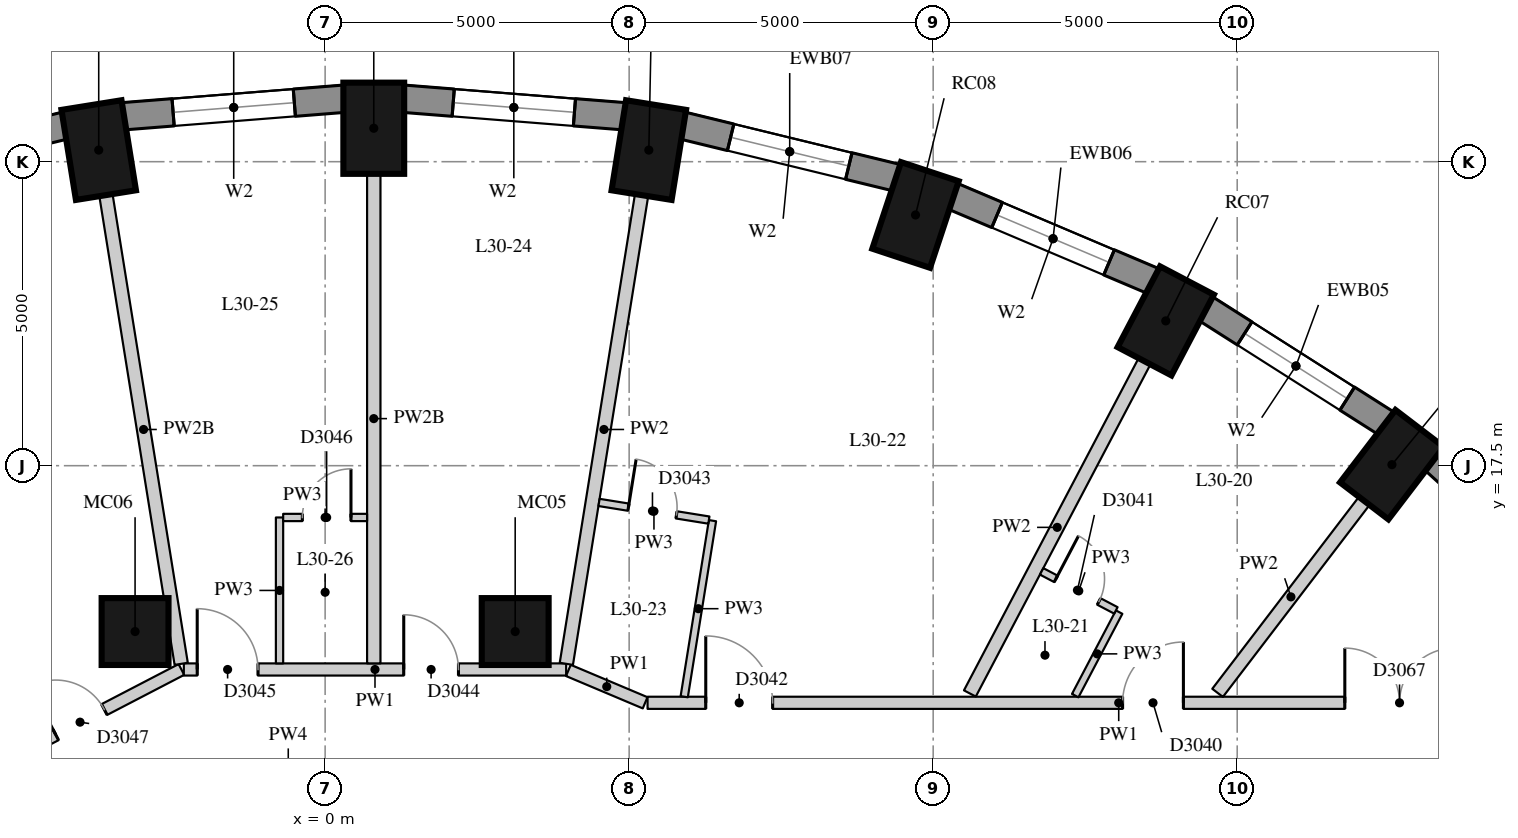
"""IFC4 building model, lengths in metres.
Left out: names, types, materials, properties, quantities, classifications, styles, units other than length and angle.
Written with IfcOpenShell. Run it as: python <this file> out.ifc"""

import sys

from ifc_helpers import new_model, si_unit, direction, frame, frame_2d, origin, origin_2d, place, context, subcontext, project, spatial, rectangle, extrude, element, fill, save


model = new_model("IFC4")
c1 = context("Model", 3, precision=1e-05, world=origin(), true_north=direction((0.0, 1.0)))
c2 = subcontext(c1, "Body", "Model", "MODEL_VIEW")
j1 = project(units=[si_unit("LENGTHUNIT", "METRE"), si_unit("PLANEANGLEUNIT", "RADIAN")], contexts=[c1])
p1 = place(None, origin())
s1 = spatial("IfcSite", under=j1, at=p1, CompositionType="ELEMENT")
p2 = place(p1, origin())
s2 = spatial("IfcBuilding", under=s1, at=p2, CompositionType="ELEMENT")
p3 = place(p2, frame((0.0, 0.0, 108.7)))
s3 = spatial("IfcBuildingStorey", under=s2, at=p3, CompositionType="ELEMENT", Elevation=108.7)
for number, where, z_axis, x_axis in (
    (1, (17.545, 17.517, 0.0), (0.0, 0.0, 1.0), (0.607, 0.795, 0.0)),
    (2, (13.825, 19.882, 0.0), (0.0, 0.0, 1.0), (0.465, 0.885, 0.0)),
    (3, (9.71, 21.624, 0.0), (0.0, 0.0, 1.0), (0.315, 0.949, 0.0)),
    (4, (5.323, 22.691, 0.0), (0.0, 0.0, 1.0), (0.159, 0.987, 0.0)),
    (5, (0.8, 23.05, 0.0), (0.0, 0.0, 1.0), (0.0, 1.0, 0.0)),
    (6, (-3.724, 22.691, 0.0), (0.0, 0.0, 1.0), (-0.159, 0.987, 0.0)),
):
    element("IfcColumn", number, at=place(p3, frame(where, z_axis=z_axis, x_axis=x_axis)), inside=s3, PredefinedType="COLUMN", context=c2, shape_type="SweptSolid", body=[
        extrude(rectangle(XDim=1.5, YDim=1.0, at=origin_2d()), origin(), (0.0, 0.0, 1.0), 3.3),
    ])
for number, where, z_axis, x_axis in (
    (7, (3.126, 14.772, 0.0), (0.0, 0.0, 1.0), (1.0, 0.0, 0.0)),
    (8, (-3.126, 14.772, 0.0), (0.0, 0.0, 1.0), (1.0, 0.0, 0.0)),
):
    element("IfcColumn", number, at=place(p3, frame(where, z_axis=z_axis, x_axis=x_axis)), inside=s3, PredefinedType="COLUMN", context=c2, shape_type="SweptSolid", body=[
        extrude(rectangle(XDim=1.1, YDim=1.1, at=origin_2d()), origin(), (0.0, 0.0, 1.0), 3.3),
    ])
p4 = place(p3, frame((20.784, 15.281, 0.0), z_axis=(0.0, 0.0, 1.0), x_axis=(-0.74032902847, 0.672244694739, 0.0)))
e9 = element("IfcWall", 9, at=p4, inside=s3, PredefinedType="SOLIDWALL", context=c2, shape_type="SweptSolid", body=[
    extrude(rectangle(XDim=3.464, YDim=0.45, at=frame_2d((1.732, 0.0))), origin(), (0.0, 0.0, 1.0), 3.02),
])
p5 = place(p3, frame((17.456, 18.192, 0.0), z_axis=(0.0, 0.0, 1.0), x_axis=(-0.843880549131, 0.536531097699, 0.0)))
e10 = element("IfcWall", 10, at=p5, inside=s3, PredefinedType="SOLIDWALL", context=c2, shape_type="SweptSolid", body=[
    extrude(rectangle(XDim=3.532, YDim=0.45, at=frame_2d((1.766, 0.0))), origin(), (0.0, 0.0, 1.0), 3.02),
])
p6 = place(p5, frame((0.766, 0.0, 0.4)))
e11 = element("IfcOpeningElement", 11, at=p6, cuts=e10, PredefinedType="OPENING", context=c2, shape_type="SweptSolid", body=[
    extrude(rectangle(XDim=2.0, YDim=1.75, at=frame_2d((1.0, 0.875))), frame((0.0, 0.235, 0.0), z_axis=(0.0, -1.0, 0.0), x_axis=(1.0, 0.0, 0.0)), (0.0, 0.0, 1.0), 0.47),
])
p7 = place(p3, frame((13.625, 20.533, 0.0), z_axis=(0.0, 0.0, 1.0), x_axis=(-0.920869643542, 0.389870619055, 0.0)))
e12 = element("IfcWall", 12, at=p7, inside=s3, PredefinedType="SOLIDWALL", context=c2, shape_type="SweptSolid", body=[
    extrude(rectangle(XDim=3.591, YDim=0.45, at=frame_2d((1.796, 0.0))), origin(), (0.0, 0.0, 1.0), 3.02),
])
p8 = place(p7, frame((0.796, 0.0, 0.4)))
e13 = element("IfcOpeningElement", 13, at=p8, cuts=e12, PredefinedType="OPENING", context=c2, shape_type="SweptSolid", body=[
    extrude(rectangle(XDim=2.0, YDim=1.75, at=frame_2d((1.0, 0.875))), frame((0.0, 0.235, 0.0), z_axis=(0.0, -1.0, 0.0), x_axis=(1.0, 0.0, 0.0)), (0.0, 0.0, 1.0), 0.47),
])
p9 = place(p3, frame((9.406, 22.235, 0.0), z_axis=(0.0, 0.0, 1.0), x_axis=(-0.971667603162, 0.236351579148, 0.0)))
e14 = element("IfcWall", 14, at=p9, inside=s3, PredefinedType="SOLIDWALL", context=c2, shape_type="SweptSolid", body=[
    extrude(rectangle(XDim=3.635, YDim=0.45, at=frame_2d((1.817, 0.0))), origin(), (0.0, 0.0, 1.0), 3.02),
])
p10 = place(p9, frame((0.817, 0.0, 0.4)))
e15 = element("IfcOpeningElement", 15, at=p10, cuts=e14, PredefinedType="OPENING", context=c2, shape_type="SweptSolid", body=[
    extrude(rectangle(XDim=2.0, YDim=1.75, at=frame_2d((1.0, 0.875))), frame((0.0, 0.235, 0.0), z_axis=(0.0, -1.0, 0.0), x_axis=(1.0, 0.0, 0.0)), (0.0, 0.0, 1.0), 0.47),
])
p11 = place(p3, frame((4.927, 23.247, 0.0), z_axis=(0.0, 0.0, 1.0), x_axis=(-0.996862216754, 0.079156306178, 0.0)))
e16 = element("IfcWall", 16, at=p11, inside=s3, PredefinedType="SOLIDWALL", context=c2, shape_type="SweptSolid", body=[
    extrude(rectangle(XDim=3.658, YDim=0.45, at=frame_2d((1.829, 0.0))), origin(), (0.0, 0.0, 1.0), 3.02),
])
p12 = place(p11, frame((0.829, 0.0, 0.4)))
e17 = element("IfcOpeningElement", 17, at=p12, cuts=e16, PredefinedType="OPENING", context=c2, shape_type="SweptSolid", body=[
    extrude(rectangle(XDim=2.0, YDim=1.75, at=frame_2d((1.0, 0.875))), frame((0.0, 0.235, 0.0), z_axis=(0.0, -1.0, 0.0), x_axis=(1.0, 0.0, 0.0)), (0.0, 0.0, 1.0), 0.47),
])
p13 = place(p3, frame((0.32, 23.536, 0.0), z_axis=(0.0, 0.0, 1.0), x_axis=(-0.996862216754, -0.079156306178, 0.0)))
e18 = element("IfcWall", 18, at=p13, inside=s3, PredefinedType="SOLIDWALL", context=c2, shape_type="SweptSolid", body=[
    extrude(rectangle(XDim=3.658, YDim=0.45, at=frame_2d((1.829, 0.0))), origin(), (0.0, 0.0, 1.0), 3.02),
])
p14 = place(p13, frame((0.829, 0.0, 0.4)))
e19 = element("IfcOpeningElement", 19, at=p14, cuts=e18, PredefinedType="OPENING", context=c2, shape_type="SweptSolid", body=[
    extrude(rectangle(XDim=2.0, YDim=1.75, at=frame_2d((1.0, 0.875))), frame((0.0, 0.235, 0.0), z_axis=(0.0, -1.0, 0.0), x_axis=(1.0, 0.0, 0.0)), (0.0, 0.0, 1.0), 0.47),
])
p15 = place(p3, frame((-4.275, 23.094, 0.0), z_axis=(0.0, 0.0, 1.0), x_axis=(-0.971667603162, -0.236351579148, 0.0)))
e20 = element("IfcWall", 20, at=p15, inside=s3, PredefinedType="SOLIDWALL", context=c2, shape_type="SweptSolid", body=[
    extrude(rectangle(XDim=3.635, YDim=0.45, at=frame_2d((1.817, 0.0))), origin(), (0.0, 0.0, 1.0), 3.02),
])
p16 = place(p15, frame((0.817, 0.0, 0.4)))
e21 = element("IfcOpeningElement", 21, at=p16, cuts=e20, PredefinedType="OPENING", context=c2, shape_type="SweptSolid", body=[
    extrude(rectangle(XDim=2.0, YDim=1.75, at=frame_2d((1.0, 0.875))), frame((0.0, 0.235, 0.0), z_axis=(0.0, -1.0, 0.0), x_axis=(1.0, 0.0, 0.0)), (0.0, 0.0, 1.0), 0.47),
])
p17 = place(p3, frame((-7.757, 11.344, 0.0), z_axis=(0.0, 0.0, 1.0), x_axis=(0.887263483993, 0.461262951008, 0.0)))
e22 = element("IfcWall", 22, at=p17, inside=s3, PredefinedType="PARTITIONING", context=c2, shape_type="SweptSolid", body=[
    extrude(rectangle(XDim=6.079, YDim=0.2, at=frame_2d((3.04, 0.0))), origin(), (0.0, 0.0, 1.0), 3.02),
])
p18 = place(p17, frame((3.75, 0.0, 0.0)))
e23 = element("IfcOpeningElement", 23, at=p18, cuts=e22, PredefinedType="OPENING", context=c2, shape_type="SweptSolid", body=[
    extrude(rectangle(XDim=0.9, YDim=2.1, at=frame_2d((0.45, 1.05))), frame((0.0, 0.11, 0.0), z_axis=(0.0, -1.0, 0.0), x_axis=(1.0, 0.0, 0.0)), (0.0, 0.0, 1.0), 0.22),
])
p19 = place(p3, frame((-2.324, 14.148, 0.0), z_axis=(0.0, 0.0, 1.0), x_axis=(1.0, 0.0, 0.0)))
e24 = element("IfcWall", 24, at=p19, inside=s3, PredefinedType="PARTITIONING", context=c2, shape_type="SweptSolid", body=[
    extrude(rectangle(XDim=6.288, YDim=0.2, at=frame_2d((3.144, 0.0))), origin(), (0.0, 0.0, 1.0), 3.02),
])
p20 = place(p19, frame((3.617, 0.0, 0.0)))
e25 = element("IfcOpeningElement", 25, at=p20, cuts=e24, PredefinedType="OPENING", context=c2, shape_type="SweptSolid", body=[
    extrude(rectangle(XDim=0.9, YDim=2.1, at=frame_2d((0.45, 1.05))), frame((0.0, 0.11, 0.0), z_axis=(0.0, -1.0, 0.0), x_axis=(1.0, 0.0, 0.0)), (0.0, 0.0, 1.0), 0.22),
])
p21 = place(p19, frame((0.22, 0.0, 0.0)))
e26 = element("IfcOpeningElement", 26, at=p21, cuts=e24, PredefinedType="OPENING", context=c2, shape_type="SweptSolid", body=[
    extrude(rectangle(XDim=1.0, YDim=2.1, at=frame_2d((0.5, 1.05))), frame((0.0, 0.11, 0.0), z_axis=(0.0, -1.0, 0.0), x_axis=(1.0, 0.0, 0.0)), (0.0, 0.0, 1.0), 0.22),
])
p22 = place(p3, frame((4.0, 14.133, 0.0), z_axis=(0.0, 0.0, 1.0), x_axis=(0.921370144432, -0.388686322051, 0.0)))
e27 = element("IfcWall", 27, at=p22, inside=s3, PredefinedType="PARTITIONING", context=c2, shape_type="SweptSolid", body=[
    extrude(rectangle(XDim=1.37, YDim=0.2, at=frame_2d((0.685, 0.0))), origin(), (0.0, 0.0, 1.0), 3.02),
])
p23 = place(p3, frame((5.303, 13.6, 0.0), z_axis=(0.0, 0.0, 1.0), x_axis=(1.0, 0.0, 0.0)))
e28 = element("IfcWall", 28, at=p23, inside=s3, PredefinedType="PARTITIONING", context=c2, shape_type="SweptSolid", body=[
    extrude(rectangle(XDim=15.497, YDim=0.2, at=frame_2d((7.749, 0.0))), origin(), (0.0, 0.0, 1.0), 3.02),
])
p24 = place(p23, frame((7.812, 0.0, 0.0)))
e29 = element("IfcOpeningElement", 29, at=p24, cuts=e28, PredefinedType="OPENING", context=c2, shape_type="SweptSolid", body=[
    extrude(rectangle(XDim=1.0, YDim=2.1, at=frame_2d((0.5, 1.05))), frame((0.0, 0.11, 0.0), z_axis=(0.0, -1.0, 0.0), x_axis=(1.0, 0.0, 0.0)), (0.0, 0.0, 1.0), 0.22),
])
p25 = place(p23, frame((0.957, 0.0, 0.0)))
e30 = element("IfcOpeningElement", 30, at=p25, cuts=e28, PredefinedType="OPENING", context=c2, shape_type="SweptSolid", body=[
    extrude(rectangle(XDim=1.1, YDim=2.1, at=frame_2d((0.55, 1.05))), frame((0.0, 0.11, 0.0), z_axis=(0.0, -1.0, 0.0), x_axis=(1.0, 0.0, 0.0)), (0.0, 0.0, 1.0), 0.22),
])
p26 = place(p23, frame((11.467, 0.0, 0.0)))
e31 = element("IfcOpeningElement", 31, at=p26, cuts=e28, PredefinedType="OPENING", context=c2, shape_type="SweptSolid", body=[
    extrude(rectangle(XDim=1.8, YDim=2.1, at=frame_2d((0.9, 1.05))), frame((0.0, 0.11, 0.0), z_axis=(0.0, -1.0, 0.0), x_axis=(1.0, 0.0, 0.0)), (0.0, 0.0, 1.0), 0.22),
])
p27 = place(p3, frame((17.089, 16.921, 0.0), z_axis=(0.0, 0.0, 1.0), x_axis=(-0.607055443677, -0.794659479464, 0.0)))
e32 = element("IfcWall", 32, at=p27, inside=s3, PredefinedType="PARTITIONING", context=c2, shape_type="SweptSolid", body=[
    extrude(rectangle(XDim=3.973, YDim=0.22, at=frame_2d((1.987, 0.0))), origin(), (0.0, 0.0, 1.0), 3.02),
])
p28 = place(p3, frame((13.476, 19.218, 0.0), z_axis=(0.0, 0.0, 1.0), x_axis=(-0.465345394262, -0.885129179295, 0.0)))
e33 = element("IfcWall", 33, at=p28, inside=s3, PredefinedType="PARTITIONING", context=c2, shape_type="SweptSolid", body=[
    extrude(rectangle(XDim=6.173, YDim=0.22, at=frame_2d((3.086, 0.0))), origin(), (0.0, 0.0, 1.0), 3.02),
])
p29 = place(p3, frame((5.205, 21.95, 0.0), z_axis=(0.0, 0.0, 1.0), x_axis=(-0.158499016873, -0.987359135092, 0.0)))
e34 = element("IfcWall", 34, at=p29, inside=s3, PredefinedType="PARTITIONING", context=c2, shape_type="SweptSolid", body=[
    extrude(rectangle(XDim=7.808, YDim=0.22, at=frame_2d((3.904, 0.0))), origin(), (0.0, 0.0, 1.0), 3.02),
])
p30 = place(p3, frame((0.8, 22.3, 0.0), z_axis=(0.0, 0.0, 1.0), x_axis=(0.0, -1.0, 0.0)))
e35 = element("IfcWall", 35, at=p30, inside=s3, PredefinedType="PARTITIONING", context=c2, shape_type="SweptSolid", body=[
    extrude(rectangle(XDim=8.052, YDim=0.22, at=frame_2d((4.026, 0.0))), origin(), (0.0, 0.0, 1.0), 2.57),
])
p31 = place(p3, frame((-3.605, 21.95, 0.0), z_axis=(0.0, 0.0, 1.0), x_axis=(0.158529499426, -0.987354241299, 0.0)))
e36 = element("IfcWall", 36, at=p31, inside=s3, PredefinedType="PARTITIONING", context=c2, shape_type="SweptSolid", body=[
    extrude(rectangle(XDim=7.808, YDim=0.22, at=frame_2d((3.904, 0.0))), origin(), (0.0, 0.0, 1.0), 2.57),
])
p32 = place(p3, frame((12.336, 13.718, 0.0), z_axis=(0.0, 0.0, 1.0), x_axis=(0.465428746876, 0.88508535271, 0.0)))
e37 = element("IfcWall", 37, at=p32, inside=s3, PredefinedType="PARTITIONING", context=c2, shape_type="SweptSolid", body=[
    extrude(rectangle(XDim=1.552, YDim=0.12, at=frame_2d((0.776, 0.0))), origin(), (0.0, 0.0, 1.0), 3.02),
])
p33 = place(p3, frame((5.906, 13.7, 0.0), z_axis=(0.0, 0.0, 1.0), x_axis=(0.158509986532, 0.98735737409, 0.0)))
e38 = element("IfcWall", 38, at=p33, inside=s3, PredefinedType="PARTITIONING", context=c2, shape_type="SweptSolid", body=[
    extrude(rectangle(XDim=2.933, YDim=0.12, at=frame_2d((1.466, 0.0))), origin(), (0.0, 0.0, 1.0), 3.02),
])
p34 = place(p3, frame((-0.75, 14.248, 0.0), z_axis=(0.0, 0.0, 1.0), x_axis=(0.0, 1.0, 0.0)))
e39 = element("IfcWall", 39, at=p34, inside=s3, PredefinedType="PARTITIONING", context=c2, shape_type="SweptSolid", body=[
    extrude(rectangle(XDim=2.4, YDim=0.12, at=frame_2d((1.2, 0.0))), origin(), (0.0, 0.0, 1.0), 3.02),
])
p35 = place(p3, frame((13.005, 15.12, 0.0), z_axis=(0.0, 0.0, 1.0), x_axis=(-0.885148383454, 0.465308864378, 0.0)))
e40 = element("IfcWall", 40, at=p35, inside=s3, PredefinedType="PARTITIONING", context=c2, shape_type="SweptSolid", body=[
    extrude(rectangle(XDim=1.38, YDim=0.12, at=frame_2d((0.69, 0.0))), origin(), (0.0, 0.0, 1.0), 3.02),
])
p36 = place(p35, frame((0.315, 0.0, 0.0)))
e41 = element("IfcOpeningElement", 41, at=p36, cuts=e40, PredefinedType="OPENING", context=c2, shape_type="SweptSolid", body=[
    extrude(rectangle(XDim=0.8, YDim=2.1, at=frame_2d((0.4, 1.05))), frame((0.0, 0.07, 0.0), z_axis=(0.0, -1.0, 0.0), x_axis=(1.0, 0.0, 0.0)), (0.0, 0.0, 1.0), 0.14),
])
p37 = place(p3, frame((6.311, 16.605, 0.0), z_axis=(0.0, 0.0, 1.0), x_axis=(-0.987336342922, 0.158640934018, 0.0)))
e42 = element("IfcWall", 42, at=p37, inside=s3, PredefinedType="PARTITIONING", context=c2, shape_type="SweptSolid", body=[
    extrude(rectangle(XDim=1.83, YDim=0.12, at=frame_2d((0.915, 0.0))), origin(), (0.0, 0.0, 1.0), 3.02),
])
p38 = place(p37, frame((0.54, 0.0, 0.0)))
e43 = element("IfcOpeningElement", 43, at=p38, cuts=e42, PredefinedType="OPENING", context=c2, shape_type="SweptSolid", body=[
    extrude(rectangle(XDim=0.8, YDim=2.1, at=frame_2d((0.4, 1.05))), frame((0.0, 0.07, 0.0), z_axis=(0.0, -1.0, 0.0), x_axis=(1.0, 0.0, 0.0)), (0.0, 0.0, 1.0), 0.14),
])
p39 = place(p3, frame((-0.69, 16.648, 0.0), z_axis=(0.0, 0.0, 1.0), x_axis=(1.0, 0.0, 0.0)))
e44 = element("IfcWall", 44, at=p39, inside=s3, PredefinedType="PARTITIONING", context=c2, shape_type="SweptSolid", body=[
    extrude(rectangle(XDim=1.38, YDim=0.12, at=frame_2d((0.69, 0.0))), origin(), (0.0, 0.0, 1.0), 3.02),
])
p40 = place(p39, frame((0.315, 0.0, 0.0)))
e45 = element("IfcOpeningElement", 45, at=p40, cuts=e44, PredefinedType="OPENING", context=c2, shape_type="SweptSolid", body=[
    extrude(rectangle(XDim=0.8, YDim=2.1, at=frame_2d((0.4, 1.05))), frame((0.0, 0.07, 0.0), z_axis=(0.0, -1.0, 0.0), x_axis=(1.0, 0.0, 0.0)), (0.0, 0.0, 1.0), 0.14),
])
p41 = place(p6, origin())
e46 = element("IfcWindow", 46, at=p41, inside=s3, PartitioningType="SINGLE_PANEL", PredefinedType="WINDOW", context=c2, shape_type="SweptSolid", body=[
    extrude(rectangle(XDim=2.0, YDim=1.75, at=frame_2d((1.0, 0.875))), frame((0.0, 0.035, 0.0), z_axis=(0.0, -1.0, 0.0), x_axis=(1.0, 0.0, 0.0)), (0.0, 0.0, 1.0), 0.06),
])
fill(e11, e46)
p42 = place(p8, origin())
e47 = element("IfcWindow", 47, at=p42, inside=s3, PartitioningType="SINGLE_PANEL", PredefinedType="WINDOW", context=c2, shape_type="SweptSolid", body=[
    extrude(rectangle(XDim=2.0, YDim=1.75, at=frame_2d((1.0, 0.875))), frame((0.0, 0.035, 0.0), z_axis=(0.0, -1.0, 0.0), x_axis=(1.0, 0.0, 0.0)), (0.0, 0.0, 1.0), 0.06),
])
fill(e13, e47)
p43 = place(p10, origin())
e48 = element("IfcWindow", 48, at=p43, inside=s3, PartitioningType="SINGLE_PANEL", PredefinedType="WINDOW", context=c2, shape_type="SweptSolid", body=[
    extrude(rectangle(XDim=2.0, YDim=1.75, at=frame_2d((1.0, 0.875))), frame((0.0, 0.035, 0.0), z_axis=(0.0, -1.0, 0.0), x_axis=(1.0, 0.0, 0.0)), (0.0, 0.0, 1.0), 0.06),
])
fill(e15, e48)
p44 = place(p12, origin())
e49 = element("IfcWindow", 49, at=p44, inside=s3, PartitioningType="SINGLE_PANEL", PredefinedType="WINDOW", context=c2, shape_type="SweptSolid", body=[
    extrude(rectangle(XDim=2.0, YDim=1.75, at=frame_2d((1.0, 0.875))), frame((0.0, 0.035, 0.0), z_axis=(0.0, -1.0, 0.0), x_axis=(1.0, 0.0, 0.0)), (0.0, 0.0, 1.0), 0.06),
])
fill(e17, e49)
p45 = place(p14, origin())
e50 = element("IfcWindow", 50, at=p45, inside=s3, PartitioningType="SINGLE_PANEL", PredefinedType="WINDOW", context=c2, shape_type="SweptSolid", body=[
    extrude(rectangle(XDim=2.0, YDim=1.75, at=frame_2d((1.0, 0.875))), frame((0.0, 0.035, 0.0), z_axis=(0.0, -1.0, 0.0), x_axis=(1.0, 0.0, 0.0)), (0.0, 0.0, 1.0), 0.06),
])
fill(e19, e50)
p46 = place(p24, origin())
e51 = element("IfcDoor", 51, at=p46, inside=s3, OperationType="SINGLE_SWING_RIGHT", PredefinedType="DOOR", context=c2, shape_type="SweptSolid", body=[
    extrude(rectangle(XDim=1.0, YDim=2.1, at=frame_2d((0.5, 1.05))), frame((0.0, 0.025, 0.0), z_axis=(0.0, -1.0, 0.0), x_axis=(1.0, 0.0, 0.0)), (0.0, 0.0, 1.0), 0.05),
])
fill(e29, e51)
p47 = place(p36, origin())
e52 = element("IfcDoor", 52, at=p47, inside=s3, OperationType="SINGLE_SWING_LEFT", PredefinedType="DOOR", context=c2, shape_type="SweptSolid", body=[
    extrude(rectangle(XDim=0.8, YDim=2.1, at=frame_2d((0.4, 1.05))), frame((0.0, 0.025, 0.0), z_axis=(0.0, -1.0, 0.0), x_axis=(1.0, 0.0, 0.0)), (0.0, 0.0, 1.0), 0.05),
])
fill(e41, e52)
p48 = place(p25, origin())
e53 = element("IfcDoor", 53, at=p48, inside=s3, OperationType="SINGLE_SWING_LEFT", PredefinedType="DOOR", context=c2, shape_type="SweptSolid", body=[
    extrude(rectangle(XDim=1.1, YDim=2.1, at=frame_2d((0.55, 1.05))), frame((0.0, 0.025, 0.0), z_axis=(0.0, -1.0, 0.0), x_axis=(1.0, 0.0, 0.0)), (0.0, 0.0, 1.0), 0.05),
])
fill(e30, e53)
p49 = place(p38, origin())
e54 = element("IfcDoor", 54, at=p49, inside=s3, OperationType="SINGLE_SWING_LEFT", PredefinedType="DOOR", context=c2, shape_type="SweptSolid", body=[
    extrude(rectangle(XDim=0.8, YDim=2.1, at=frame_2d((0.4, 1.05))), frame((0.0, 0.025, 0.0), z_axis=(0.0, -1.0, 0.0), x_axis=(1.0, 0.0, 0.0)), (0.0, 0.0, 1.0), 0.05),
])
fill(e43, e54)
p50 = place(p20, origin())
e55 = element("IfcDoor", 55, at=p50, inside=s3, OperationType="SINGLE_SWING_LEFT", PredefinedType="DOOR", context=c2, shape_type="SweptSolid", body=[
    extrude(rectangle(XDim=0.9, YDim=2.1, at=frame_2d((0.45, 1.05))), frame((0.0, 0.025, 0.0), z_axis=(0.0, -1.0, 0.0), x_axis=(1.0, 0.0, 0.0)), (0.0, 0.0, 1.0), 0.05),
])
fill(e25, e55)
p51 = place(p21, origin())
e56 = element("IfcDoor", 56, at=p51, inside=s3, OperationType="SINGLE_SWING_LEFT", PredefinedType="DOOR", context=c2, shape_type="SweptSolid", body=[
    extrude(rectangle(XDim=1.0, YDim=2.1, at=frame_2d((0.5, 1.05))), frame((0.0, 0.025, 0.0), z_axis=(0.0, -1.0, 0.0), x_axis=(1.0, 0.0, 0.0)), (0.0, 0.0, 1.0), 0.05),
])
fill(e26, e56)
p52 = place(p40, origin())
e57 = element("IfcDoor", 57, at=p52, inside=s3, OperationType="SINGLE_SWING_RIGHT", PredefinedType="DOOR", context=c2, shape_type="SweptSolid", body=[
    extrude(rectangle(XDim=0.8, YDim=2.1, at=frame_2d((0.4, 1.05))), frame((0.0, 0.025, 0.0), z_axis=(0.0, -1.0, 0.0), x_axis=(1.0, 0.0, 0.0)), (0.0, 0.0, 1.0), 0.05),
])
fill(e45, e57)
p53 = place(p18, origin())
e58 = element("IfcDoor", 58, at=p53, inside=s3, OperationType="SINGLE_SWING_LEFT", PredefinedType="DOOR", context=c2, shape_type="SweptSolid", body=[
    extrude(rectangle(XDim=0.9, YDim=2.1, at=frame_2d((0.45, 1.05))), frame((0.0, 0.025, 0.0), z_axis=(0.0, -1.0, 0.0), x_axis=(1.0, 0.0, 0.0)), (0.0, 0.0, 1.0), 0.05),
])
fill(e23, e58)
p54 = place(p26, origin())
e59 = element("IfcDoor", 59, at=p54, inside=s3, OperationType="DOUBLE_DOOR_SINGLE_SWING", PredefinedType="DOOR", context=c2, shape_type="SweptSolid", body=[
    extrude(rectangle(XDim=1.8, YDim=2.1, at=frame_2d((0.9, 1.05))), frame((0.0, 0.025, 0.0), z_axis=(0.0, -1.0, 0.0), x_axis=(1.0, 0.0, 0.0)), (0.0, 0.0, 1.0), 0.05),
])
fill(e31, e59)
save(model, sys.argv[1])
